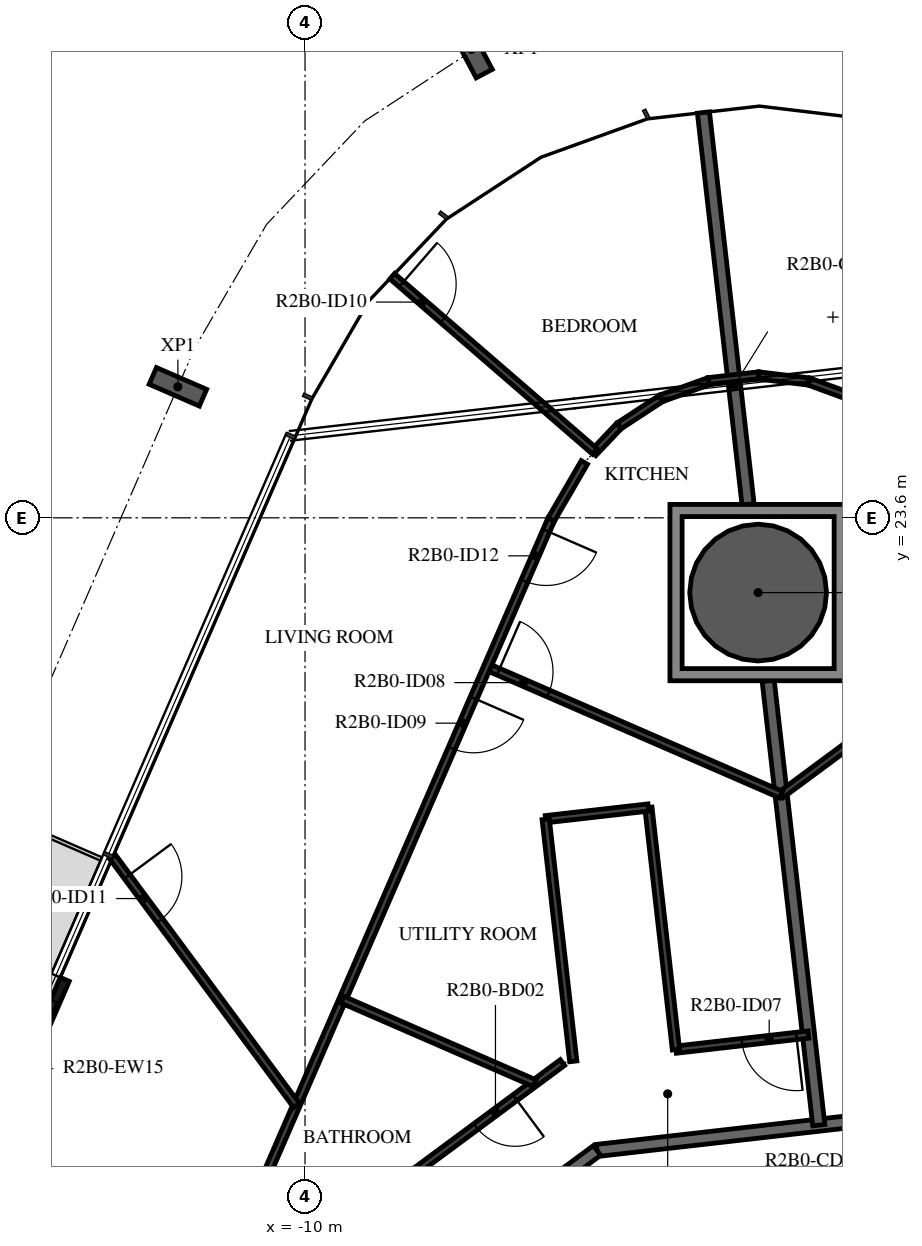
"""IFC4 building model, lengths in metres.
Left out: names, types, materials, properties, quantities, classifications, styles, units other than length and angle.
Written with IfcOpenShell. Run it as: python <this file> out.ifc"""

import sys

from ifc_helpers import new_model, si_unit, direction, frame, frame_2d, origin, origin_2d, place, context, subcontext, project, spatial, polyline, rectangle, hollow_circle, i_section, outline, extrude, element, fill, save


model = new_model("IFC4")
c1 = context("Model", 3, precision=1e-05, world=origin(), true_north=direction((0.0, 1.0)))
c2 = subcontext(c1, "Body", "Model", "MODEL_VIEW")
j1 = project(units=[si_unit("LENGTHUNIT", "METRE"), si_unit("PLANEANGLEUNIT", "RADIAN")], contexts=[c1])
p1 = place(None, origin())
s1 = spatial("IfcSite", under=j1, at=p1, CompositionType="ELEMENT")
p2 = place(p1, origin())
s2 = spatial("IfcBuilding", under=s1, at=p2, CompositionType="ELEMENT")
p3 = place(p2, frame((0.0, 0.0, 90.7)))
s3 = spatial("IfcBuildingStorey", under=s2, at=p3, CompositionType="ELEMENT", Elevation=90.7)
p4 = place(p3, frame((-2.549, 22.37, -0.38), z_axis=(0.0, 0.0, 1.0), x_axis=(1.0, 0.0, 0.0)))
e1 = element("IfcColumn", 1, at=p4, inside=s3, PredefinedType="COLUMN", context=c2, shape_type="SweptSolid", body=[
    extrude(hollow_circle(Radius=1.125, WallThickness=0.055, at=origin_2d()), origin(), (0.0, 0.0, 1.0), 3.5),
])
for number, where, z_axis, x_axis in (
    (2, (-7.263, 31.302, -0.38), (0.0, 0.0, 1.0), (0.884, 0.467, 0.0)),
    (3, (-12.091, 25.754, -0.38), (0.0, 0.0, 1.0), (0.399, 0.917, 0.0)),
):
    element("IfcColumn", number, at=place(p3, frame(where, z_axis=z_axis, x_axis=x_axis)), inside=s3, PredefinedType="COLUMN", context=c2, shape_type="SweptSolid", body=[
        extrude(i_section(OverallWidth=0.3, OverallDepth=0.9, WebThickness=0.019, FlangeThickness=0.035, FilletRadius=0.03, at=origin_2d()), origin(), (0.0, 0.0, 1.0), 3.5),
    ])
p5 = place(p3, frame((-13.951, 16.01, 0.0), z_axis=(0.0, 0.0, 1.0), x_axis=(-0.398720531764, -0.917072482168, 0.0)))
e4 = element("IfcWall", 4, at=p5, inside=s3, PredefinedType="STANDARD", context=c2, shape_type="SweptSolid", body=[
    extrude(rectangle(XDim=3.2, YDim=0.16, at=frame_2d((1.6, 0.0))), origin(), (0.0, 0.0, 1.0), 3.12),
])
p6 = place(p5, frame((0.4, 0.0, 0.0)))
e5 = element("IfcOpeningElement", 5, at=p6, cuts=e4, PredefinedType="OPENING", context=c2, shape_type="SweptSolid", body=[
    extrude(rectangle(XDim=2.4, YDim=2.4, at=frame_2d((1.2, 1.2))), frame((0.0, 0.09, 0.0), z_axis=(0.0, -1.0, 0.0), x_axis=(1.0, 0.0, 0.0)), (0.0, 0.0, 1.0), 0.18),
])
p7 = place(p3, frame((2.096, 14.028, 0.0), z_axis=(0.0, 0.0, 1.0), x_axis=(-0.993569170114, -0.113226782163, 0.0)))
e6 = element("IfcWall", 6, at=p7, inside=s3, PredefinedType="STANDARD", context=c2, shape_type="SweptSolid", body=[
    extrude(rectangle(XDim=7.342, YDim=0.2, at=frame_2d((3.671, 0.0))), origin(), (0.0, 0.0, 1.0), 3.12),
])
p8 = place(p3, frame((-5.198, 13.196, 0.0), z_axis=(0.0, 0.0, 1.0), x_axis=(-0.803864151363, -0.594812933748, 0.0)))
e7 = element("IfcWall", 7, at=p8, inside=s3, PredefinedType="STANDARD", context=c2, shape_type="SweptSolid", body=[
    extrude(rectangle(XDim=7.24, YDim=0.2, at=frame_2d((3.62, 0.0))), origin(), (0.0, 0.0, 1.0), 3.12),
])
p9 = place(p8, frame((5.7, 0.0, 0.0)))
e8 = element("IfcOpeningElement", 8, at=p9, cuts=e7, PredefinedType="OPENING", context=c2, shape_type="SweptSolid", body=[
    extrude(rectangle(XDim=1.0, YDim=2.1, at=frame_2d((0.5, 1.05))), frame((0.0, 0.11, 0.0), z_axis=(0.0, -1.0, 0.0), x_axis=(1.0, 0.0, 0.0)), (0.0, 0.0, 1.0), 0.22),
])
p10 = place(p3, frame((-2.384, 20.92, 0.0), z_axis=(0.0, 0.0, 1.0), x_axis=(0.113210540889, -0.993571020829, 0.0)))
e9 = element("IfcWall", 9, at=p10, inside=s3, PredefinedType="STANDARD", context=c2, shape_type="SweptSolid", body=[
    extrude(rectangle(XDim=7.356, YDim=0.2, at=frame_2d((3.678, 0.0))), origin(), (0.0, 0.0, 1.0), 3.12),
])
p11 = place(p3, frame((-3.448, 30.265, 0.0), z_axis=(0.0, 0.0, 1.0), x_axis=(0.113178237968, -0.993574700992, 0.0)))
e10 = element("IfcWall", 10, at=p11, inside=s3, PredefinedType="STANDARD", context=c2, shape_type="SweptSolid", body=[
    extrude(rectangle(XDim=6.487, YDim=0.2, at=frame_2d((3.243, 0.0))), origin(), (0.0, 0.0, 1.0), 3.12),
])
p12 = place(p3, frame((2.068, 22.183, 0.0), z_axis=(0.0, 0.0, 1.0), x_axis=(-0.803867138365, -0.594808896921, 0.0)))
e11 = element("IfcWall", 11, at=p12, inside=s3, PredefinedType="PARTITIONING", context=c2, shape_type="SweptSolid", body=[
    extrude(rectangle(XDim=5.273, YDim=0.12, at=frame_2d((2.636, 0.0))), origin(), (0.0, 0.0, 1.0), 3.12),
])
p13 = place(p12, frame((0.2, 0.0, 0.0)))
e12 = element("IfcOpeningElement", 12, at=p13, cuts=e11, PredefinedType="OPENING", context=c2, shape_type="SweptSolid", body=[
    extrude(rectangle(XDim=0.9, YDim=2.1, at=frame_2d((0.45, 1.05))), frame((0.0, 0.07, 0.0), z_axis=(0.0, -1.0, 0.0), x_axis=(1.0, 0.0, 0.0)), (0.0, 0.0, 1.0), 0.14),
])
for number, where, z_axis, x_axis in (
    (13, (-3.362, 25.846, 0.0), (0.0, 0.0, 1.0), (0.994, 0.113, 0.0)),
    (14, (-2.538, 25.94, 0.0), (0.0, 0.0, 1.0), (0.993, -0.119, 0.0)),
    (15, (-1.715, 25.842, 0.0), (0.0, 0.0, 1.0), (0.939, -0.345, 0.0)),
):
    element("IfcWall", number, at=place(p3, frame(where, z_axis=z_axis, x_axis=x_axis)), inside=s3, PredefinedType="PARTITIONING", context=c2, shape_type="SweptSolid", body=[
        extrude(rectangle(XDim=0.829, YDim=0.12, at=frame_2d((0.415, 0.0))), origin(), (0.0, 0.0, 1.0), 3.12),
    ])
p14 = place(p3, frame((-1.721, 15.102, 0.0), z_axis=(0.0, 0.0, 1.0), x_axis=(-0.993571720958, -0.11320439617, 0.0)))
e16 = element("IfcWall", 16, at=p14, inside=s3, PredefinedType="PARTITIONING", context=c2, shape_type="SweptSolid", body=[
    extrude(rectangle(XDim=2.193, YDim=0.12, at=frame_2d((1.097, 0.0))), origin(), (0.0, 0.0, 1.0), 3.12),
])
p15 = place(p14, frame((0.2, 0.0, 0.0)))
e17 = element("IfcOpeningElement", 17, at=p15, cuts=e16, PredefinedType="OPENING", context=c2, shape_type="SweptSolid", body=[
    extrude(rectangle(XDim=0.9, YDim=2.1, at=frame_2d((0.45, 1.05))), frame((0.0, 0.07, 0.0), z_axis=(0.0, -1.0, 0.0), x_axis=(1.0, 0.0, 0.0)), (0.0, 0.0, 1.0), 0.14),
])
p16 = place(p3, frame((-3.9, 14.854, 0.0), z_axis=(0.0, 0.0, 1.0), x_axis=(-0.113178937308, 0.993574621329, 0.0)))
e18 = element("IfcWall", 18, at=p16, inside=s3, PredefinedType="PARTITIONING", context=c2, shape_type="SweptSolid", body=[
    extrude(rectangle(XDim=4.008, YDim=0.12, at=frame_2d((2.004, 0.0))), origin(), (0.0, 0.0, 1.0), 3.12),
])
p17 = place(p3, frame((-4.354, 18.836, 0.0), z_axis=(0.0, 0.0, 1.0), x_axis=(-0.99355903199, -0.113315709199, 0.0)))
e19 = element("IfcWall", 19, at=p17, inside=s3, PredefinedType="PARTITIONING", context=c2, shape_type="SweptSolid", body=[
    extrude(rectangle(XDim=1.7, YDim=0.12, at=frame_2d((0.85, 0.0))), origin(), (0.0, 0.0, 1.0), 3.12),
])
p18 = place(p3, frame((-6.042, 18.644, 0.0), z_axis=(0.0, 0.0, 1.0), x_axis=(0.113185787648, -0.993573840977, 0.0)))
e20 = element("IfcWall", 20, at=p18, inside=s3, PredefinedType="PARTITIONING", context=c2, shape_type="SweptSolid", body=[
    extrude(rectangle(XDim=4.008, YDim=0.12, at=frame_2d((2.004, 0.0))), origin(), (0.0, 0.0, 1.0), 3.12),
])
p19 = place(p3, frame((-5.767, 14.641, 0.0), z_axis=(0.0, 0.0, 1.0), x_axis=(-0.803853364238, -0.594827511807, 0.0)))
e21 = element("IfcWall", 21, at=p19, inside=s3, PredefinedType="PARTITIONING", context=c2, shape_type="SweptSolid", body=[
    extrude(rectangle(XDim=8.146, YDim=0.12, at=frame_2d((4.073, 0.0))), origin(), (0.0, 0.0, 1.0), 3.12),
])
p20 = place(p19, frame((0.97, 0.0, 0.0)))
e22 = element("IfcOpeningElement", 22, at=p20, cuts=e21, PredefinedType="OPENING", context=c2, shape_type="SweptSolid", body=[
    extrude(rectangle(XDim=0.8, YDim=2.1, at=frame_2d((0.4, 1.05))), frame((0.0, 0.07, 0.0), z_axis=(0.0, -1.0, 0.0), x_axis=(1.0, 0.0, 0.0)), (0.0, 0.0, 1.0), 0.14),
])
p21 = place(p3, frame((-5.261, 24.663, 0.0), z_axis=(0.0, 0.0, 1.0), x_axis=(0.688324306424, 0.725403094277, 0.0)))
e23 = element("IfcWall", 23, at=p21, inside=s3, PredefinedType="PARTITIONING", context=c2, shape_type="SweptSolid", body=[
    extrude(rectangle(XDim=0.619, YDim=0.12, at=frame_2d((0.31, 0.0))), origin(), (0.0, 0.0, 1.0), 3.12),
])
p22 = place(p3, frame((-4.835, 25.112, 0.0), z_axis=(0.0, 0.0, 1.0), x_axis=(0.837047461437, 0.547130283664, 0.0)))
e24 = element("IfcWall", 24, at=p22, inside=s3, PredefinedType="PARTITIONING", context=c2, shape_type="SweptSolid", body=[
    extrude(rectangle(XDim=0.829, YDim=0.12, at=frame_2d((0.414, 0.0))), origin(), (0.0, 0.0, 1.0), 3.12),
])
p23 = place(p3, frame((-4.142, 25.565, 0.0), z_axis=(0.0, 0.0, 1.0), x_axis=(0.940718391217, 0.33918860303, 0.0)))
e25 = element("IfcWall", 25, at=p23, inside=s3, PredefinedType="PARTITIONING", context=c2, shape_type="SweptSolid", body=[
    extrude(rectangle(XDim=0.829, YDim=0.12, at=frame_2d((0.415, 0.0))), origin(), (0.0, 0.0, 1.0), 3.12),
])
p24 = place(p3, frame((-8.566, 27.573, 0.0), z_axis=(0.0, 0.0, 1.0), x_axis=(0.756463964606, -0.654035373854, 0.0)))
e26 = element("IfcWall", 26, at=p24, inside=s3, PredefinedType="PARTITIONING", context=c2, shape_type="SweptSolid", body=[
    extrude(rectangle(XDim=4.405, YDim=0.12, at=frame_2d((2.202, 0.0))), origin(), (0.0, 0.0, 1.0), 3.12),
])
p25 = place(p24, frame((0.2, 0.0, 0.0)))
e27 = element("IfcOpeningElement", 27, at=p25, cuts=e26, PredefinedType="OPENING", context=c2, shape_type="SweptSolid", body=[
    extrude(rectangle(XDim=0.9, YDim=2.1, at=frame_2d((0.45, 1.05))), frame((0.0, 0.07, 0.0), z_axis=(0.0, -1.0, 0.0), x_axis=(1.0, 0.0, 0.0)), (0.0, 0.0, 1.0), 0.14),
])
p26 = place(p3, frame((-7.005, 21.149, 0.0), z_axis=(0.0, 0.0, 1.0), x_axis=(0.917050915224, -0.398770132891, 0.0)))
e28 = element("IfcWall", 28, at=p26, inside=s3, PredefinedType="PARTITIONING", context=c2, shape_type="SweptSolid", body=[
    extrude(rectangle(XDim=5.272, YDim=0.12, at=frame_2d((2.636, 0.0))), origin(), (0.0, 0.0, 1.0), 3.12),
])
p27 = place(p26, frame((0.2, 0.0, 0.0)))
e29 = element("IfcOpeningElement", 29, at=p27, cuts=e28, PredefinedType="OPENING", context=c2, shape_type="SweptSolid", body=[
    extrude(rectangle(XDim=0.9, YDim=2.1, at=frame_2d((0.45, 1.05))), frame((0.0, 0.07, 0.0), z_axis=(0.0, -1.0, 0.0), x_axis=(1.0, 0.0, 0.0)), (0.0, 0.0, 1.0), 0.14),
])
p28 = place(p3, frame((-5.406, 24.51, 0.0), z_axis=(0.0, 0.0, 1.0), x_axis=(-0.502487709822, -0.864584351858, 0.0)))
e30 = element("IfcWall", 30, at=p28, inside=s3, PredefinedType="PARTITIONING", context=c2, shape_type="SweptSolid", body=[
    extrude(rectangle(XDim=1.087, YDim=0.12, at=frame_2d((0.543, 0.0))), origin(), (0.0, 0.0, 1.0), 3.12),
])
p29 = place(p3, frame((-5.952, 23.571, 0.0), z_axis=(0.0, 0.0, 1.0), x_axis=(-0.398745097158, -0.917061801348, 0.0)))
e31 = element("IfcWall", 31, at=p29, inside=s3, PredefinedType="PARTITIONING", context=c2, shape_type="SweptSolid", body=[
    extrude(rectangle(XDim=14.576, YDim=0.12, at=frame_2d((7.288, 0.0))), origin(), (0.0, 0.0, 1.0), 3.12),
])
p30 = place(p29, frame((3.201, 0.0, 0.0)))
e32 = element("IfcOpeningElement", 32, at=p30, cuts=e31, PredefinedType="OPENING", context=c2, shape_type="SweptSolid", body=[
    extrude(rectangle(XDim=0.9, YDim=2.1, at=frame_2d((0.45, 1.05))), frame((0.0, 0.07, 0.0), z_axis=(0.0, -1.0, 0.0), x_axis=(1.0, 0.0, 0.0)), (0.0, 0.0, 1.0), 0.14),
])
p31 = place(p29, frame((0.2, 0.0, 0.0)))
e33 = element("IfcOpeningElement", 33, at=p31, cuts=e31, PredefinedType="OPENING", context=c2, shape_type="SweptSolid", body=[
    extrude(rectangle(XDim=0.9, YDim=2.1, at=frame_2d((0.45, 1.05))), frame((0.0, 0.07, 0.0), z_axis=(0.0, -1.0, 0.0), x_axis=(1.0, 0.0, 0.0)), (0.0, 0.0, 1.0), 0.14),
])
p32 = place(p3, frame((-9.385, 15.676, 0.0), z_axis=(0.0, 0.0, 1.0), x_axis=(0.917068929701, -0.398728702475, 0.0)))
e34 = element("IfcWall", 34, at=p32, inside=s3, PredefinedType="PARTITIONING", context=c2, shape_type="SweptSolid", body=[
    extrude(rectangle(XDim=3.445, YDim=0.12, at=frame_2d((1.723, 0.0))), origin(), (0.0, 0.0, 1.0), 3.12),
])
p33 = place(p3, frame((-13.163, 18.022, 0.0), z_axis=(0.0, 0.0, 1.0), x_axis=(0.594797671626, -0.803875444226, 0.0)))
e35 = element("IfcWall", 35, at=p33, inside=s3, PredefinedType="PARTITIONING", context=c2, shape_type="SweptSolid", body=[
    extrude(rectangle(XDim=5.081, YDim=0.12, at=frame_2d((2.54, 0.0))), origin(), (0.0, 0.0, 1.0), 3.12),
])
p34 = place(p33, frame((0.4, 0.0, 0.0)))
e36 = element("IfcOpeningElement", 36, at=p34, cuts=e35, PredefinedType="OPENING", context=c2, shape_type="SweptSolid", body=[
    extrude(rectangle(XDim=0.9, YDim=2.1, at=frame_2d((0.45, 1.05))), frame((0.0, 0.07, 0.0), z_axis=(0.0, -1.0, 0.0), x_axis=(1.0, 0.0, 0.0)), (0.0, 0.0, 1.0), 0.14),
])
p35 = place(p3, origin())
e37 = element("IfcWall", 37, at=p35, inside=s3, PredefinedType="STANDARD", context=c2, shape_type="SweptSolid", body=[
    extrude(outline(polyline([(-1.099, 23.82), (-1.099, 20.92), (-3.999, 20.92), (-3.999, 23.82), (-1.099, 23.82)]), holes=[polyline([(-3.799, 21.12), (-1.299, 21.12), (-1.299, 23.62), (-3.799, 23.62), (-3.799, 21.12)])]), origin(), (0.0, 0.0, 1.0), 3.12),
])
p36 = place(p6, origin())
e38 = element("IfcDoor", 38, at=p36, inside=s3, OperationType="DOUBLE_DOOR_SLIDING", PredefinedType="DOOR", context=c2, shape_type="SweptSolid", body=[
    extrude(rectangle(XDim=2.4, YDim=2.4, at=frame_2d((1.2, 1.2))), frame((0.0, 0.025, 0.0), z_axis=(0.0, -1.0, 0.0), x_axis=(1.0, 0.0, 0.0)), (0.0, 0.0, 1.0), 0.05),
])
fill(e5, e38)
p37 = place(p15, origin())
e39 = element("IfcDoor", 39, at=p37, inside=s3, OperationType="SINGLE_SWING_LEFT", PredefinedType="DOOR", context=c2, shape_type="SweptSolid", body=[
    extrude(rectangle(XDim=0.9, YDim=2.1, at=frame_2d((0.45, 1.05))), frame((0.0, 0.025, 0.0), z_axis=(0.0, -1.0, 0.0), x_axis=(1.0, 0.0, 0.0)), (0.0, 0.0, 1.0), 0.05),
])
fill(e17, e39)
p38 = place(p20, origin())
e40 = element("IfcDoor", 40, at=p38, inside=s3, OperationType="SINGLE_SWING_LEFT", PredefinedType="DOOR", context=c2, shape_type="SweptSolid", body=[
    extrude(rectangle(XDim=0.8, YDim=2.1, at=frame_2d((0.4, 1.05))), frame((0.0, 0.025, 0.0), z_axis=(0.0, -1.0, 0.0), x_axis=(1.0, 0.0, 0.0)), (0.0, 0.0, 1.0), 0.05),
])
fill(e22, e40)
p39 = place(p27, origin())
e41 = element("IfcDoor", 41, at=p39, inside=s3, OperationType="SINGLE_SWING_LEFT", PredefinedType="DOOR", context=c2, shape_type="SweptSolid", body=[
    extrude(rectangle(XDim=0.9, YDim=2.1, at=frame_2d((0.45, 1.05))), frame((0.0, 0.025, 0.0), z_axis=(0.0, -1.0, 0.0), x_axis=(1.0, 0.0, 0.0)), (0.0, 0.0, 1.0), 0.05),
])
fill(e29, e41)
p40 = place(p30, origin())
e42 = element("IfcDoor", 42, at=p40, inside=s3, OperationType="SINGLE_SWING_LEFT", PredefinedType="DOOR", context=c2, shape_type="SweptSolid", body=[
    extrude(rectangle(XDim=0.9, YDim=2.1, at=frame_2d((0.45, 1.05))), frame((0.0, 0.025, 0.0), z_axis=(0.0, -1.0, 0.0), x_axis=(1.0, 0.0, 0.0)), (0.0, 0.0, 1.0), 0.05),
])
fill(e32, e42)
p41 = place(p25, origin())
e43 = element("IfcDoor", 43, at=p41, inside=s3, OperationType="SINGLE_SWING_LEFT", PredefinedType="DOOR", context=c2, shape_type="SweptSolid", body=[
    extrude(rectangle(XDim=0.9, YDim=2.1, at=frame_2d((0.45, 1.05))), frame((0.0, 0.025, 0.0), z_axis=(0.0, -1.0, 0.0), x_axis=(1.0, 0.0, 0.0)), (0.0, 0.0, 1.0), 0.05),
])
fill(e27, e43)
p42 = place(p34, origin())
e44 = element("IfcDoor", 44, at=p42, inside=s3, OperationType="SINGLE_SWING_RIGHT", PredefinedType="DOOR", context=c2, shape_type="SweptSolid", body=[
    extrude(rectangle(XDim=0.9, YDim=2.1, at=frame_2d((0.45, 1.05))), frame((0.0, 0.025, 0.0), z_axis=(0.0, -1.0, 0.0), x_axis=(1.0, 0.0, 0.0)), (0.0, 0.0, 1.0), 0.05),
])
fill(e36, e44)
p43 = place(p31, origin())
e45 = element("IfcDoor", 45, at=p43, inside=s3, OperationType="SINGLE_SWING_RIGHT", PredefinedType="DOOR", context=c2, shape_type="SweptSolid", body=[
    extrude(rectangle(XDim=0.9, YDim=2.1, at=frame_2d((0.45, 1.05))), frame((0.0, 0.025, 0.0), z_axis=(0.0, -1.0, 0.0), x_axis=(1.0, 0.0, 0.0)), (0.0, 0.0, 1.0), 0.05),
])
fill(e33, e45)
save(model, sys.argv[1])
